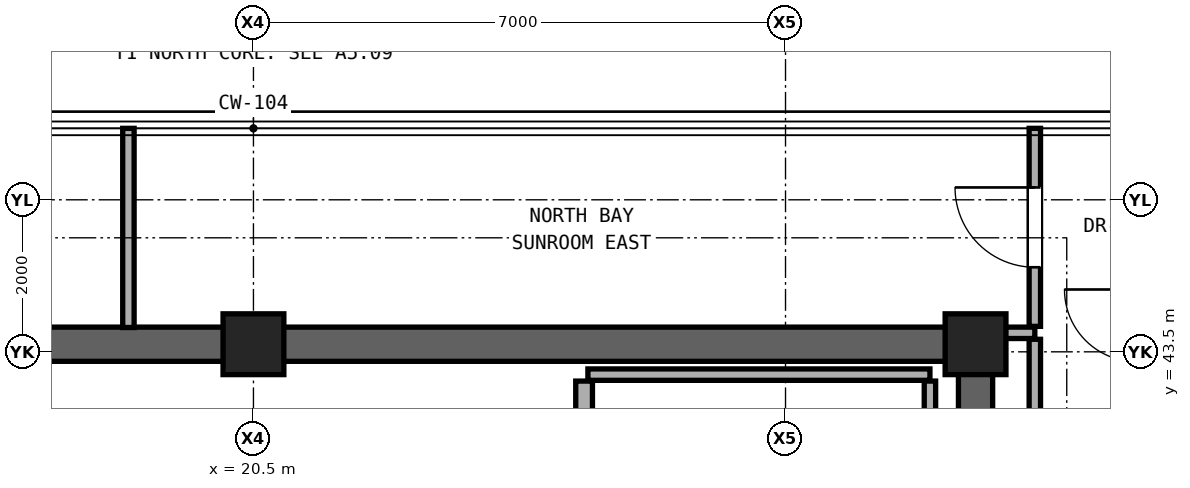
"""IFC4 building model, lengths in metres.
Left out: names, types, materials, properties, quantities, classifications, styles, units other than length and angle.
Written with IfcOpenShell. Run it as: python <this file> out.ifc"""

import sys

from ifc_helpers import new_model, si_unit, direction, frame, frame_2d, origin, origin_2d, place, context, subcontext, project, spatial, rectangle, extrude, element, fill, save


model = new_model("IFC4")
c1 = context("Model", 3, precision=1e-05, world=origin(), true_north=direction((0.0, 1.0)))
c2 = subcontext(c1, "Body", "Model", "MODEL_VIEW")
j1 = project(units=[si_unit("LENGTHUNIT", "METRE"), si_unit("PLANEANGLEUNIT", "RADIAN")], contexts=[c1])
p1 = place(None, origin())
s1 = spatial("IfcSite", under=j1, at=p1, CompositionType="ELEMENT")
p2 = place(p1, origin())
s2 = spatial("IfcBuilding", under=s1, at=p2, CompositionType="ELEMENT")
p3 = place(p2, frame((0.0, 0.0, 219.4)))
s3 = spatial("IfcBuildingStorey", under=s2, at=p3, CompositionType="ELEMENT", Elevation=219.4)
for number, where, z_axis, x_axis in (
    (1, (20.5, 43.6, 0.0), (0.0, 0.0, 1.0), (1.0, 0.0, 0.0)),
    (2, (30.0, 43.6, 0.0), (0.0, 0.0, 1.0), (1.0, 0.0, 0.0)),
):
    element("IfcColumn", number, at=place(p3, frame(where, z_axis=z_axis, x_axis=x_axis)), inside=s3, PredefinedType="COLUMN", context=c2, shape_type="SweptSolid", body=[
        extrude(rectangle(XDim=0.8, YDim=0.8, at=origin_2d()), origin(), (0.0, 0.0, 1.0), 3.3),
    ])
p4 = place(p3, frame((11.0, 43.6, 0.0), z_axis=(0.0, 0.0, 1.0), x_axis=(1.0, 0.0, 0.0)))
e3 = element("IfcWall", 3, at=p4, inside=s3, PredefinedType="SHEAR", context=c2, shape_type="SweptSolid", body=[
    extrude(rectangle(XDim=19.0, YDim=0.45, at=frame_2d((9.5, 0.0))), origin(), (0.0, 0.0, 1.0), 3.1),
])
p5 = place(p3, frame((30.0, 37.6, 0.0), z_axis=(0.0, 0.0, 1.0), x_axis=(0.0, 1.0, 0.0)))
e4 = element("IfcWall", 4, at=p5, inside=s3, PredefinedType="SHEAR", context=c2, shape_type="SweptSolid", body=[
    extrude(rectangle(XDim=6.0, YDim=0.45, at=frame_2d((3.0, 0.0))), origin(), (0.0, 0.0, 1.0), 3.1),
])
p6 = place(p3, frame((24.9, 43.2, 0.0), z_axis=(0.0, 0.0, 1.0), x_axis=(1.0, 0.0, 0.0)))
e5 = element("IfcWall", 5, at=p6, inside=s3, PredefinedType="PARTITIONING", context=c2, shape_type="SweptSolid", body=[
    extrude(rectangle(XDim=4.5, YDim=0.15, at=frame_2d((2.25, 0.0))), origin(), (0.0, 0.0, 1.0), 3.1),
])
p7 = place(p3, frame((30.22, 43.75, 0.0), z_axis=(0.0, 0.0, 1.0), x_axis=(1.0, 0.0, 0.0)))
e6 = element("IfcWall", 6, at=p7, inside=s3, PredefinedType="PARTITIONING", context=c2, shape_type="SweptSolid", body=[
    extrude(rectangle(XDim=0.56, YDim=0.15, at=frame_2d((0.28, 0.0))), origin(), (0.0, 0.0, 1.0), 3.1),
])
p8 = place(p3, frame((18.855, 43.82, 0.0), z_axis=(0.0, 0.0, 1.0), x_axis=(0.0, 1.0, 0.0)))
e7 = element("IfcWall", 7, at=p8, inside=s3, PredefinedType="PARTITIONING", context=c2, shape_type="SweptSolid", body=[
    extrude(rectangle(XDim=2.62, YDim=0.15, at=frame_2d((1.31, 0.0))), origin(), (0.0, 0.0, 1.0), 3.1),
])
p9 = place(p3, frame((24.85, 40.26, 0.0), z_axis=(0.0, 0.0, 1.0), x_axis=(0.0, 1.0, 0.0)))
e8 = element("IfcWall", 8, at=p9, inside=s3, PredefinedType="SOLIDWALL", context=c2, shape_type="SweptSolid", body=[
    extrude(rectangle(XDim=2.855, YDim=0.22, at=frame_2d((1.427, 0.0))), origin(), (0.0, 0.0, 1.0), 3.1),
])
p10 = place(p3, frame((29.4, 37.82, 0.0), z_axis=(0.0, 0.0, 1.0), x_axis=(0.0, 1.0, 0.0)))
e9 = element("IfcWall", 9, at=p10, inside=s3, PredefinedType="PARTITIONING", context=c2, shape_type="SweptSolid", body=[
    extrude(rectangle(XDim=5.295, YDim=0.15, at=frame_2d((2.647, 0.0))), origin(), (0.0, 0.0, 1.0), 3.1),
])
p11 = place(p3, frame((30.78, 34.57, 0.0), z_axis=(0.0, 0.0, 1.0), x_axis=(0.0, 1.0, 0.0)))
e10 = element("IfcWall", 10, at=p11, inside=s3, PredefinedType="PARTITIONING", context=c2, shape_type="SweptSolid", body=[
    extrude(rectangle(XDim=9.095, YDim=0.15, at=frame_2d((4.547, 0.0))), origin(), (0.0, 0.0, 1.0), 2.492),
])
p12 = place(p3, frame((30.78, 43.835, 0.0), z_axis=(0.0, 0.0, 1.0), x_axis=(0.0, 1.0, 0.0)))
e11 = element("IfcWall", 11, at=p12, inside=s3, PredefinedType="PARTITIONING", context=c2, shape_type="SweptSolid", body=[
    extrude(rectangle(XDim=2.605, YDim=0.15, at=frame_2d((1.302, 0.0))), origin(), (0.0, 0.0, 1.0), 3.1),
])
p13 = place(p12, frame((0.778, 0.0, 0.0)))
e12 = element("IfcOpeningElement", 12, at=p13, cuts=e11, PredefinedType="OPENING", context=c2, shape_type="SweptSolid", body=[
    extrude(rectangle(XDim=1.05, YDim=2.2, at=frame_2d((0.525, 1.1))), frame((0.0, 0.085, 0.0), z_axis=(0.0, -1.0, 0.0), x_axis=(1.0, 0.0, 0.0)), (0.0, 0.0, 1.0), 0.17),
])
p14 = place(p13, origin())
e13 = element("IfcDoor", 13, at=p14, inside=s3, OperationType="SINGLE_SWING_RIGHT", PredefinedType="DOOR", context=c2, shape_type="SweptSolid", body=[
    extrude(rectangle(XDim=1.05, YDim=2.2, at=frame_2d((0.525, 1.1))), frame((0.0, 0.025, 0.0), z_axis=(0.0, -1.0, 0.0), x_axis=(1.0, 0.0, 0.0)), (0.0, 0.0, 1.0), 0.05),
])
fill(e12, e13)
save(model, sys.argv[1])
